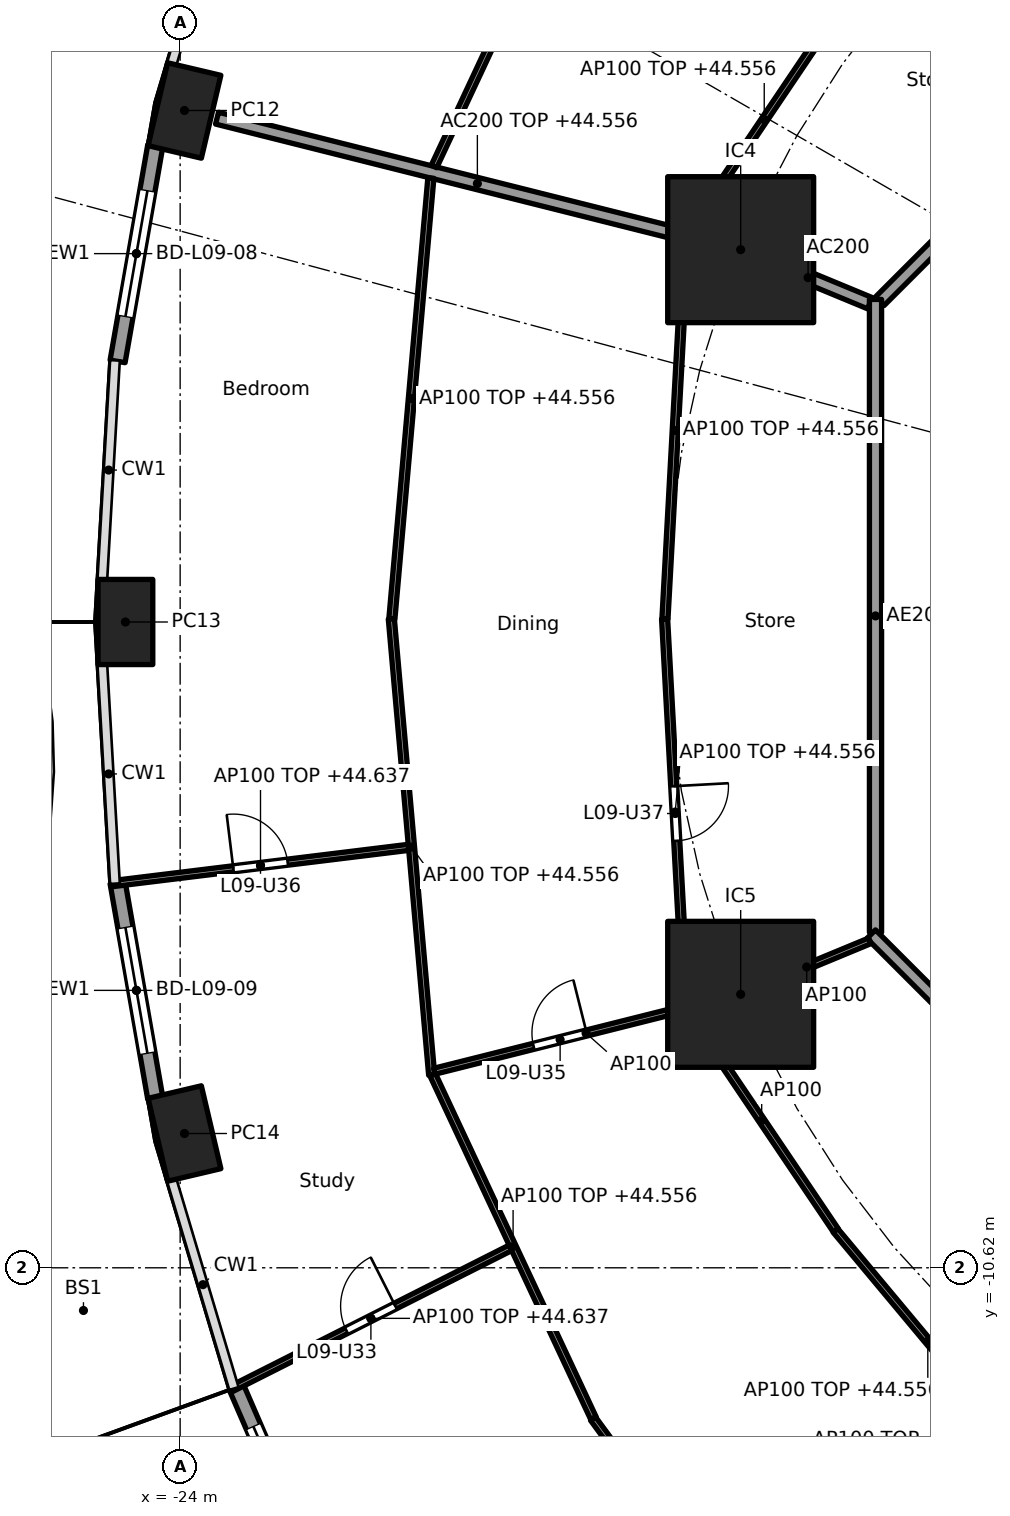
"""IFC4 building model, lengths in metres.
Left out: names, types, materials, properties, quantities, classifications, styles, units other than length and angle.
Written with IfcOpenShell. Run it as: python <this file> out.ifc"""

import sys

from ifc_helpers import new_model, si_unit, direction, frame, frame_2d, origin, origin_2d, place, context, subcontext, project, spatial, rectangle, hollow_rectangle, extrude, element, fill, save


model = new_model("IFC4")
c1 = context("Model", 3, precision=1e-05, world=origin(), true_north=direction((0.0, 1.0)))
c2 = subcontext(c1, "Body", "Model", "MODEL_VIEW")
j1 = project(units=[si_unit("LENGTHUNIT", "METRE"), si_unit("PLANEANGLEUNIT", "RADIAN")], contexts=[c1])
p1 = place(None, origin())
s1 = spatial("IfcSite", under=j1, at=p1, CompositionType="ELEMENT")
p2 = place(p1, origin())
s2 = spatial("IfcBuilding", under=s1, at=p2, CompositionType="ELEMENT")
p3 = place(p2, frame((0.0, 0.0, 41.8)))
s3 = spatial("IfcBuildingStorey", under=s2, at=p3, CompositionType="ELEMENT", Elevation=41.8)
for number, where, z_axis, x_axis in (
    (1, (-23.929, 8.412, 0.0), (0.0, 0.0, 1.0), (-0.229, -0.973, 0.0)),
    (2, (-24.9, 0.0, 0.0), (0.0, 0.0, 1.0), (0.0, -1.0, 0.0)),
    (3, (-23.929, -8.412, 0.0), (0.0, 0.0, 1.0), (0.229, -0.973, 0.0)),
):
    element("IfcColumn", number, at=place(p3, frame(where, z_axis=z_axis, x_axis=x_axis)), inside=s3, PredefinedType="COLUMN", context=c2, shape_type="SweptSolid", body=[
        extrude(hollow_rectangle(XDim=1.4, YDim=0.9, WallThickness=0.05, at=origin_2d()), origin(), (0.0, 0.0, 1.0), 3.7),
    ])
for number, where, z_axis, x_axis in (
    (4, (-14.782, 6.123, 0.0), (0.0, 0.0, 1.0), (1.0, 0.0, 0.0)),
    (5, (-14.782, -6.123, 0.0), (0.0, 0.0, 1.0), (1.0, 0.0, 0.0)),
):
    element("IfcColumn", number, at=place(p3, frame(where, z_axis=z_axis, x_axis=x_axis)), inside=s3, PredefinedType="COLUMN", context=c2, shape_type="SweptSolid", body=[
        extrude(rectangle(XDim=2.4, YDim=2.4, at=origin_2d()), origin(), (0.0, 0.0, 1.0), 3.7),
    ])
p4 = place(p3, frame((-25.029, 4.286, 0.0), z_axis=(0.0, 0.0, 1.0), x_axis=(0.172217377323, 0.98505897029, 0.0)))
e6 = element("IfcWall", 6, at=p4, inside=s3, PredefinedType="SOLIDWALL", context=c2, shape_type="SweptSolid", body=[
    extrude(rectangle(XDim=3.598, YDim=0.25, at=frame_2d((1.799, 0.0))), origin(), (0.0, 0.0, 1.0), 3.44),
])
p5 = place(p4, frame((0.749, 0.0, 0.0)))
e7 = element("IfcOpeningElement", 7, at=p5, cuts=e6, PredefinedType="OPENING", context=c2, shape_type="SweptSolid", body=[
    extrude(rectangle(XDim=2.1, YDim=2.4, at=frame_2d((1.05, 1.2))), frame((0.0, 0.135, 0.0), z_axis=(0.0, -1.0, 0.0), x_axis=(1.0, 0.0, 0.0)), (0.0, 0.0, 1.0), 0.27),
])
p6 = place(p3, frame((-24.409, -7.83, 0.0), z_axis=(0.0, 0.0, 1.0), x_axis=(-0.172217377323, 0.98505897029, 0.0)))
e8 = element("IfcWall", 8, at=p6, inside=s3, PredefinedType="SOLIDWALL", context=c2, shape_type="SweptSolid", body=[
    extrude(rectangle(XDim=3.598, YDim=0.25, at=frame_2d((1.799, 0.0))), origin(), (0.0, 0.0, 1.0), 3.44),
])
p7 = place(p6, frame((0.749, 0.0, 0.0)))
e9 = element("IfcOpeningElement", 9, at=p7, cuts=e8, PredefinedType="OPENING", context=c2, shape_type="SweptSolid", body=[
    extrude(rectangle(XDim=2.1, YDim=2.4, at=frame_2d((1.05, 1.2))), frame((0.0, 0.135, 0.0), z_axis=(0.0, -1.0, 0.0), x_axis=(1.0, 0.0, 0.0)), (0.0, 0.0, 1.0), 0.27),
])
p8 = place(p3, frame((-21.678, -15.808, 0.0), z_axis=(0.0, 0.0, 1.0), x_axis=(-0.397624958345, 0.917548032803, 0.0)))
e10 = element("IfcWall", 10, at=p8, inside=s3, PredefinedType="SOLIDWALL", context=c2, shape_type="SweptSolid", body=[
    extrude(rectangle(XDim=3.52, YDim=0.25, at=frame_2d((1.76, 0.0))), origin(), (0.0, 0.0, 1.0), 3.44),
])
p9 = place(p8, frame((0.71, 0.0, 0.0)))
e11 = element("IfcOpeningElement", 11, at=p9, cuts=e10, PredefinedType="OPENING", context=c2, shape_type="SweptSolid", body=[
    extrude(rectangle(XDim=2.1, YDim=2.4, at=frame_2d((1.05, 1.2))), frame((0.0, 0.135, 0.0), z_axis=(0.0, -1.0, 0.0), x_axis=(1.0, 0.0, 0.0)), (0.0, 0.0, 1.0), 0.27),
])
p10 = place(p3, frame((-12.657, 5.243, 0.0), z_axis=(0.0, 0.0, 1.0), x_axis=(-0.923885664896, 0.382668627144, 0.0)))
e12 = element("IfcWall", 12, at=p10, inside=s3, PredefinedType="PARTITIONING", context=c2, shape_type="SweptSolid", body=[
    extrude(rectangle(XDim=2.2, YDim=0.2, at=frame_2d((1.1, 0.0))), origin(), (0.0, 0.0, 1.0), 3.44),
])
p11 = place(p3, frame((-14.831, 6.135, 0.0), z_axis=(0.0, 0.0, 1.0), x_axis=(-0.969884949569, 0.243563512454, 0.0)))
e13 = element("IfcWall", 13, at=p11, inside=s3, PredefinedType="PARTITIONING", context=c2, shape_type="SweptSolid", body=[
    extrude(rectangle(XDim=8.829, YDim=0.2, at=frame_2d((4.415, 0.0))), origin(), (0.0, 0.0, 1.0), 2.756),
])
p12 = place(p3, frame((-5.275, 12.494, 0.0), z_axis=(0.0, 0.0, 1.0), x_axis=(-0.707106781187, -0.707106781187, 0.0)))
e14 = element("IfcWall", 14, at=p12, inside=s3, PredefinedType="PARTITIONING", context=c2, shape_type="SweptSolid", body=[
    extrude(rectangle(XDim=10.209, YDim=0.2, at=frame_2d((5.104, 0.0))), origin(), (0.0, 0.0, 1.0), 3.44),
])
p13 = place(p12, frame((2.87, 0.0, 0.0)))
e15 = element("IfcOpeningElement", 15, at=p13, cuts=e14, PredefinedType="OPENING", context=c2, shape_type="SweptSolid", body=[
    extrude(rectangle(XDim=1.0, YDim=2.1, at=frame_2d((0.5, 1.05))), frame((0.0, 0.11, 0.0), z_axis=(0.0, -1.0, 0.0), x_axis=(1.0, 0.0, 0.0)), (0.0, 0.0, 1.0), 0.22),
])
p14 = place(p3, frame((-12.565, 5.304, 0.0), z_axis=(0.0, 0.0, 1.0), x_axis=(0.0, -1.0, 0.0)))
e16 = element("IfcWall", 16, at=p14, inside=s3, PredefinedType="PARTITIONING", context=c2, shape_type="SweptSolid", body=[
    extrude(rectangle(XDim=10.409, YDim=0.2, at=frame_2d((5.205, 0.0))), origin(), (0.0, 0.0, 1.0), 3.44),
])
p15 = place(p3, frame((-12.635, -5.134, 0.0), z_axis=(0.0, 0.0, 1.0), x_axis=(0.707106781187, -0.707106781187, 0.0)))
e17 = element("IfcWall", 17, at=p15, inside=s3, PredefinedType="PARTITIONING", context=c2, shape_type="SweptSolid", body=[
    extrude(rectangle(XDim=10.609, YDim=0.2, at=frame_2d((5.305, 0.0))), origin(), (0.0, 0.0, 1.0), 3.44),
])
p16 = place(p3, frame((-8.953, 8.958, 0.0), z_axis=(0.0, 0.0, 1.0), x_axis=(-0.684574307023, 0.728943082939, 0.0)))
e18 = element("IfcWall", 18, at=p16, inside=s3, PredefinedType="PARTITIONING", context=c2, shape_type="SweptSolid", body=[
    extrude(rectangle(XDim=15.231, YDim=0.1, at=frame_2d((7.615, 0.0))), origin(), (0.0, 0.0, 1.0), 2.687),
])
p17 = place(p16, frame((1.54, 0.0, 0.0)))
e19 = element("IfcOpeningElement", 19, at=p17, cuts=e18, PredefinedType="OPENING", context=c2, shape_type="SweptSolid", body=[
    extrude(rectangle(XDim=0.9, YDim=2.1, at=frame_2d((0.45, 1.05))), frame((0.0, 0.06, 0.0), z_axis=(0.0, -1.0, 0.0), x_axis=(1.0, 0.0, 0.0)), (0.0, 0.0, 1.0), 0.12),
])
p18 = place(p16, frame((6.174, 0.0, 0.0)))
e20 = element("IfcOpeningElement", 20, at=p18, cuts=e18, PredefinedType="OPENING", context=c2, shape_type="SweptSolid", body=[
    extrude(rectangle(XDim=0.9, YDim=2.1, at=frame_2d((0.45, 1.05))), frame((0.0, 0.06, 0.0), z_axis=(0.0, -1.0, 0.0), x_axis=(1.0, 0.0, 0.0)), (0.0, 0.0, 1.0), 0.12),
])
p19 = place(p16, frame((11.8, 0.0, 0.0)))
e21 = element("IfcOpeningElement", 21, at=p19, cuts=e18, PredefinedType="OPENING", context=c2, shape_type="SweptSolid", body=[
    extrude(rectangle(XDim=0.9, YDim=2.1, at=frame_2d((0.45, 1.05))), frame((0.0, 0.06, 0.0), z_axis=(0.0, -1.0, 0.0), x_axis=(1.0, 0.0, 0.0)), (0.0, 0.0, 1.0), 0.12),
])
p20 = place(p3, frame((-13.162, 10.087, 0.0), z_axis=(0.0, 0.0, 1.0), x_axis=(-0.55912750241, -0.829081682375, 0.0)))
e22 = element("IfcWall", 22, at=p20, inside=s3, PredefinedType="PARTITIONING", context=c2, shape_type="SweptSolid", body=[
    extrude(rectangle(XDim=4.408, YDim=0.1, at=frame_2d((2.204, 0.0))), origin(), (0.0, 0.0, 1.0), 2.756),
])
p21 = place(p3, frame((-17.203, 13.095, 0.0), z_axis=(0.0, 0.0, 1.0), x_axis=(-0.423926333401, -0.905696673202, 0.0)))
e23 = element("IfcWall", 23, at=p21, inside=s3, PredefinedType="PARTITIONING", context=c2, shape_type="SweptSolid", body=[
    extrude(rectangle(XDim=6.188, YDim=0.1, at=frame_2d((3.094, 0.0))), origin(), (0.0, 0.0, 1.0), 2.756),
])
p22 = place(p3, frame((-15.688, 6.249, 0.0), z_axis=(0.0, 0.0, 1.0), x_axis=(-0.054659814056, -0.998505034903, 0.0)))
e24 = element("IfcWall", 24, at=p22, inside=s3, PredefinedType="PARTITIONING", context=c2, shape_type="SweptSolid", body=[
    extrude(rectangle(XDim=6.208, YDim=0.1, at=frame_2d((3.104, 0.0))), origin(), (0.0, 0.0, 1.0), 2.756),
])
p23 = place(p3, frame((-19.877, 7.301, 0.0), z_axis=(0.0, 0.0, 1.0), x_axis=(-0.088143415068, -0.996107794558, 0.0)))
e25 = element("IfcWall", 25, at=p23, inside=s3, PredefinedType="PARTITIONING", context=c2, shape_type="SweptSolid", body=[
    extrude(rectangle(XDim=7.279, YDim=0.1, at=frame_2d((3.64, 0.0))), origin(), (0.0, 0.0, 1.0), 2.756),
])
p24 = place(p3, frame((-16.033, 0.05, 0.0), z_axis=(0.0, 0.0, 1.0), x_axis=(0.054634315779, -0.998506430395, 0.0)))
e26 = element("IfcWall", 26, at=p24, inside=s3, PredefinedType="PARTITIONING", context=c2, shape_type="SweptSolid", body=[
    extrude(rectangle(XDim=6.359, YDim=0.1, at=frame_2d((3.179, 0.0))), origin(), (0.0, 0.0, 1.0), 2.756),
])
p25 = place(p24, frame((2.754, 0.0, 0.0)))
e27 = element("IfcOpeningElement", 27, at=p25, cuts=e26, PredefinedType="OPENING", context=c2, shape_type="SweptSolid", body=[
    extrude(rectangle(XDim=0.9, YDim=2.1, at=frame_2d((0.45, 1.05))), frame((0.0, 0.06, 0.0), z_axis=(0.0, -1.0, 0.0), x_axis=(1.0, 0.0, 0.0)), (0.0, 0.0, 1.0), 0.12),
])
p26 = place(p3, frame((-20.527, 0.05, 0.0), z_axis=(0.0, 0.0, 1.0), x_axis=(0.088135127406, -0.996108527881, 0.0)))
e28 = element("IfcWall", 28, at=p26, inside=s3, PredefinedType="PARTITIONING", context=c2, shape_type="SweptSolid", body=[
    extrude(rectangle(XDim=7.529, YDim=0.1, at=frame_2d((3.765, 0.0))), origin(), (0.0, 0.0, 1.0), 2.756),
])
p27 = place(p3, frame((-20.245, -3.706, 0.0), z_axis=(0.0, 0.0, 1.0), x_axis=(-0.992575966227, -0.121626277047, 0.0)))
e29 = element("IfcWall", 29, at=p27, inside=s3, PredefinedType="PARTITIONING", context=c2, shape_type="SweptSolid", body=[
    extrude(rectangle(XDim=4.904, YDim=0.1, at=frame_2d((2.452, 0.0))), origin(), (0.0, 0.0, 1.0), 2.837),
])
p28 = place(p27, frame((2.002, 0.0, 0.0)))
e30 = element("IfcOpeningElement", 30, at=p28, cuts=e29, PredefinedType="OPENING", context=c2, shape_type="SweptSolid", body=[
    extrude(rectangle(XDim=0.9, YDim=2.1, at=frame_2d((0.45, 1.05))), frame((0.0, 0.06, 0.0), z_axis=(0.0, -1.0, 0.0), x_axis=(1.0, 0.0, 0.0)), (0.0, 0.0, 1.0), 0.12),
])
p29 = place(p3, frame((-12.657, -5.243, 0.0), z_axis=(0.0, 0.0, 1.0), x_axis=(-0.923864733477, -0.382719158442, 0.0)))
e31 = element("IfcWall", 31, at=p29, inside=s3, PredefinedType="PARTITIONING", context=c2, shape_type="SweptSolid", body=[
    extrude(rectangle(XDim=2.25, YDim=0.1, at=frame_2d((1.125, 0.0))), origin(), (0.0, 0.0, 1.0), 3.44),
])
p30 = place(p3, frame((-14.831, -6.135, 0.0), z_axis=(0.0, 0.0, 1.0), x_axis=(-0.96988230015, -0.243574062362, 0.0)))
e32 = element("IfcWall", 32, at=p30, inside=s3, PredefinedType="PARTITIONING", context=c2, shape_type="SweptSolid", body=[
    extrude(rectangle(XDim=5.144, YDim=0.1, at=frame_2d((2.572, 0.0))), origin(), (0.0, 0.0, 1.0), 3.44),
])
p31 = place(p30, frame((2.561, 0.0, 0.0)))
e33 = element("IfcOpeningElement", 33, at=p31, cuts=e32, PredefinedType="OPENING", context=c2, shape_type="SweptSolid", body=[
    extrude(rectangle(XDim=0.9, YDim=2.1, at=frame_2d((0.45, 1.05))), frame((0.0, 0.06, 0.0), z_axis=(0.0, -1.0, 0.0), x_axis=(1.0, 0.0, 0.0)), (0.0, 0.0, 1.0), 0.12),
])
p32 = place(p3, frame((-15.655, -6.391, 0.0), z_axis=(0.0, 0.0, 1.0), x_axis=(0.559126445155, -0.82908239538, 0.0)))
e34 = element("IfcWall", 34, at=p32, inside=s3, PredefinedType="PARTITIONING", context=c2, shape_type="SweptSolid", body=[
    extrude(rectangle(XDim=4.358, YDim=0.1, at=frame_2d((2.179, 0.0))), origin(), (0.0, 0.0, 1.0), 3.44),
])
p33 = place(p3, frame((-19.847, -7.445, 0.0), z_axis=(0.0, 0.0, 1.0), x_axis=(0.423892287987, -0.905712607942, 0.0)))
e35 = element("IfcWall", 35, at=p33, inside=s3, PredefinedType="PARTITIONING", context=c2, shape_type="SweptSolid", body=[
    extrude(rectangle(XDim=6.238, YDim=0.1, at=frame_2d((3.119, 0.0))), origin(), (0.0, 0.0, 1.0), 2.756),
])
p34 = place(p3, frame((-18.569, -10.292, 0.0), z_axis=(0.0, 0.0, 1.0), x_axis=(-0.892519131357, -0.451009534446, 0.0)))
e36 = element("IfcWall", 36, at=p34, inside=s3, PredefinedType="PARTITIONING", context=c2, shape_type="SweptSolid", body=[
    extrude(rectangle(XDim=5.14, YDim=0.1, at=frame_2d((2.57, 0.0))), origin(), (0.0, 0.0, 1.0), 2.837),
])
p35 = place(p34, frame((2.12, 0.0, 0.0)))
e37 = element("IfcOpeningElement", 37, at=p35, cuts=e36, PredefinedType="OPENING", context=c2, shape_type="SweptSolid", body=[
    extrude(rectangle(XDim=0.9, YDim=2.1, at=frame_2d((0.45, 1.05))), frame((0.0, 0.06, 0.0), z_axis=(0.0, -1.0, 0.0), x_axis=(1.0, 0.0, 0.0)), (0.0, 0.0, 1.0), 0.12),
])
p36 = place(p3, frame((-13.222, -10.007, 0.0), z_axis=(0.0, 0.0, 1.0), x_axis=(0.640807748916, -0.767701393075, 0.0)))
e38 = element("IfcWall", 38, at=p36, inside=s3, PredefinedType="PARTITIONING", context=c2, shape_type="SweptSolid", body=[
    extrude(rectangle(XDim=4.737, YDim=0.1, at=frame_2d((2.368, 0.0))), origin(), (0.0, 0.0, 1.0), 2.756),
])
p37 = place(p3, frame((-17.211, -13.1, 0.0), z_axis=(0.0, 0.0, 1.0), x_axis=(0.591206785834, -0.806520016109, 0.0)))
e39 = element("IfcWall", 39, at=p37, inside=s3, PredefinedType="PARTITIONING", context=c2, shape_type="SweptSolid", body=[
    extrude(rectangle(XDim=6.41, YDim=0.1, at=frame_2d((3.205, 0.0))), origin(), (0.0, 0.0, 1.0), 2.756),
])
p38 = place(p3, frame((-7.715, -10.193, 0.0), z_axis=(0.0, 0.0, 1.0), x_axis=(-0.573126502256, -0.819466907454, 0.0)))
e40 = element("IfcWall", 40, at=p38, inside=s3, PredefinedType="PARTITIONING", context=c2, shape_type="SweptSolid", body=[
    extrude(rectangle(XDim=9.954, YDim=0.1, at=frame_2d((4.977, 0.0))), origin(), (0.0, 0.0, 1.0), 2.687),
])
p39 = place(p38, frame((6.631, 0.0, 0.0)))
e41 = element("IfcOpeningElement", 41, at=p39, cuts=e40, PredefinedType="OPENING", context=c2, shape_type="SweptSolid", body=[
    extrude(rectangle(XDim=0.9, YDim=2.1, at=frame_2d((0.45, 1.05))), frame((0.0, 0.06, 0.0), z_axis=(0.0, -1.0, 0.0), x_axis=(1.0, 0.0, 0.0)), (0.0, 0.0, 1.0), 0.12),
])
p40 = place(p38, frame((1.678, 0.0, 0.0)))
e42 = element("IfcOpeningElement", 42, at=p40, cuts=e40, PredefinedType="OPENING", context=c2, shape_type="SweptSolid", body=[
    extrude(rectangle(XDim=0.9, YDim=2.1, at=frame_2d((0.45, 1.05))), frame((0.0, 0.06, 0.0), z_axis=(0.0, -1.0, 0.0), x_axis=(1.0, 0.0, 0.0)), (0.0, 0.0, 1.0), 0.12),
])
p41 = place(p5, origin())
e43 = element("IfcDoor", 43, at=p41, inside=s3, OperationType="SLIDING_TO_LEFT", PredefinedType="DOOR", context=c2, shape_type="SweptSolid", body=[
    extrude(rectangle(XDim=2.1, YDim=2.4, at=frame_2d((1.05, 1.2))), frame((0.0, 0.025, 0.0), z_axis=(0.0, -1.0, 0.0), x_axis=(1.0, 0.0, 0.0)), (0.0, 0.0, 1.0), 0.05),
])
fill(e7, e43)
p42 = place(p7, origin())
e44 = element("IfcDoor", 44, at=p42, inside=s3, OperationType="SLIDING_TO_LEFT", PredefinedType="DOOR", context=c2, shape_type="SweptSolid", body=[
    extrude(rectangle(XDim=2.1, YDim=2.4, at=frame_2d((1.05, 1.2))), frame((0.0, 0.025, 0.0), z_axis=(0.0, -1.0, 0.0), x_axis=(1.0, 0.0, 0.0)), (0.0, 0.0, 1.0), 0.05),
])
fill(e9, e44)
p43 = place(p9, origin())
e45 = element("IfcDoor", 45, at=p43, inside=s3, OperationType="SLIDING_TO_LEFT", PredefinedType="DOOR", context=c2, shape_type="SweptSolid", body=[
    extrude(rectangle(XDim=2.1, YDim=2.4, at=frame_2d((1.05, 1.2))), frame((0.0, 0.025, 0.0), z_axis=(0.0, -1.0, 0.0), x_axis=(1.0, 0.0, 0.0)), (0.0, 0.0, 1.0), 0.05),
])
fill(e11, e45)
p44 = place(p35, frame((0.9, 0.0, 0.0), x_axis=(-1.0, 0.0, 0.0)))
e46 = element("IfcDoor", 46, at=p44, inside=s3, OperationType="SINGLE_SWING_RIGHT", PredefinedType="DOOR", context=c2, shape_type="SweptSolid", body=[
    extrude(rectangle(XDim=0.9, YDim=2.1, at=frame_2d((0.45, 1.05))), frame((0.0, 0.025, 0.0), z_axis=(0.0, -1.0, 0.0), x_axis=(1.0, 0.0, 0.0)), (0.0, 0.0, 1.0), 0.05),
])
fill(e37, e46)
p45 = place(p31, frame((0.9, 0.0, 0.0), x_axis=(-1.0, 0.0, 0.0)))
e47 = element("IfcDoor", 47, at=p45, inside=s3, OperationType="SINGLE_SWING_RIGHT", PredefinedType="DOOR", context=c2, shape_type="SweptSolid", body=[
    extrude(rectangle(XDim=0.9, YDim=2.1, at=frame_2d((0.45, 1.05))), frame((0.0, 0.025, 0.0), z_axis=(0.0, -1.0, 0.0), x_axis=(1.0, 0.0, 0.0)), (0.0, 0.0, 1.0), 0.05),
])
fill(e33, e47)
p46 = place(p28, frame((0.9, 0.0, 0.0), x_axis=(-1.0, 0.0, 0.0)))
e48 = element("IfcDoor", 48, at=p46, inside=s3, OperationType="SINGLE_SWING_LEFT", PredefinedType="DOOR", context=c2, shape_type="SweptSolid", body=[
    extrude(rectangle(XDim=0.9, YDim=2.1, at=frame_2d((0.45, 1.05))), frame((0.0, 0.025, 0.0), z_axis=(0.0, -1.0, 0.0), x_axis=(1.0, 0.0, 0.0)), (0.0, 0.0, 1.0), 0.05),
])
fill(e30, e48)
p47 = place(p25, origin())
e49 = element("IfcDoor", 49, at=p47, inside=s3, OperationType="SINGLE_SWING_LEFT", PredefinedType="DOOR", context=c2, shape_type="SweptSolid", body=[
    extrude(rectangle(XDim=0.9, YDim=2.1, at=frame_2d((0.45, 1.05))), frame((0.0, 0.025, 0.0), z_axis=(0.0, -1.0, 0.0), x_axis=(1.0, 0.0, 0.0)), (0.0, 0.0, 1.0), 0.05),
])
fill(e27, e49)
save(model, sys.argv[1])
